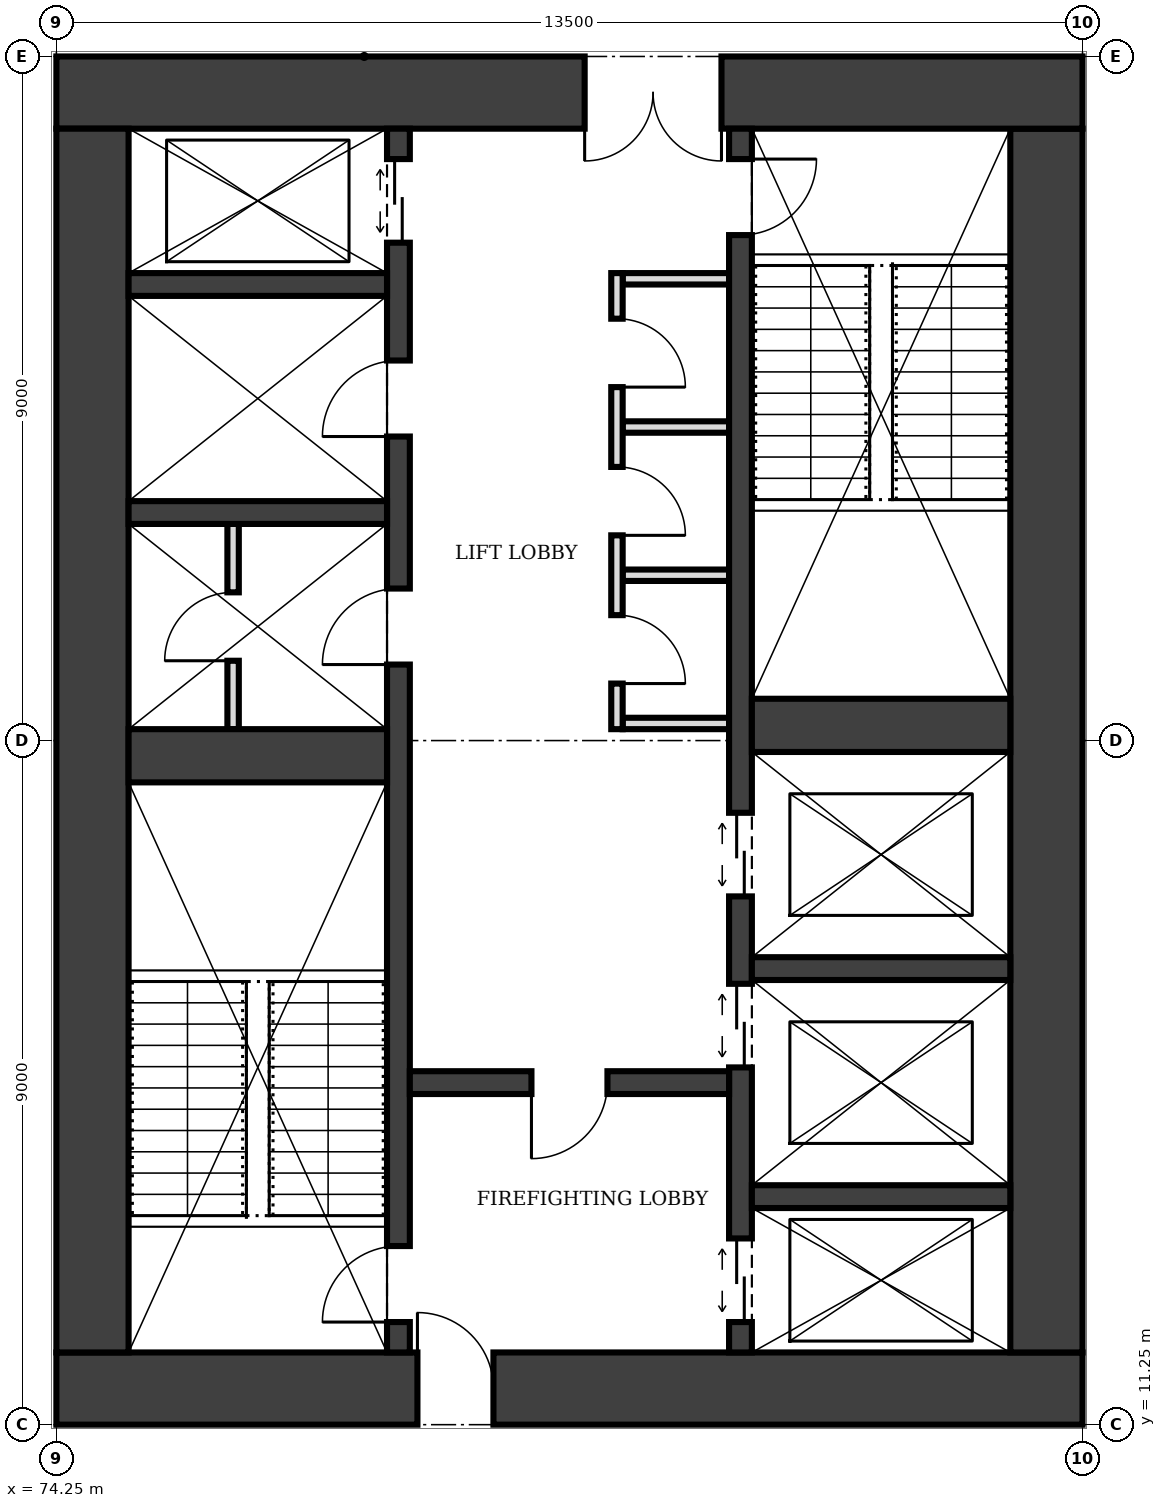
"""IFC4 building model, lengths in metres.
Left out: names, types, materials, properties, quantities, classifications, styles, units other than length and angle.
Written with IfcOpenShell. Run it as: python <this file> out.ifc"""

import sys

from ifc_helpers import new_model, si_unit, direction, frame, frame_2d, origin, place, context, subcontext, project, spatial, rectangle, extrude, element, fill, save


model = new_model("IFC4")
c1 = context("Model", 3, precision=1e-05, world=origin(), true_north=direction((0.0, 1.0)))
c2 = subcontext(c1, "Body", "Model", "MODEL_VIEW")
j1 = project(units=[si_unit("LENGTHUNIT", "METRE"), si_unit("PLANEANGLEUNIT", "RADIAN")], contexts=[c1])
p1 = place(None, origin())
s1 = spatial("IfcSite", under=j1, at=p1, CompositionType="ELEMENT")
p2 = place(p1, origin())
s2 = spatial("IfcBuilding", under=s1, at=p2, CompositionType="ELEMENT")
p3 = place(p2, frame((0.0, 0.0, 197.0)))
s3 = spatial("IfcBuildingStorey", under=s2, at=p3, CompositionType="ELEMENT", Elevation=197.0)
p4 = place(p3, frame((74.25, 11.725, 0.0), z_axis=(0.0, 0.0, 1.0), x_axis=(1.0, 0.0, 0.0)))
e1 = element("IfcWall", 1, at=p4, inside=s3, PredefinedType="SHEAR", context=c2, shape_type="SweptSolid", body=[
    extrude(rectangle(XDim=13.5, YDim=0.95, at=frame_2d((6.75, 0.0))), origin(), (0.0, 0.0, 1.0), 4.0),
])
p5 = place(p4, frame((4.75, 0.0, 0.0)))
e2 = element("IfcOpeningElement", 2, at=p5, cuts=e1, PredefinedType="OPENING", context=c2, shape_type="SweptSolid", body=[
    extrude(rectangle(XDim=1.0, YDim=2.1, at=frame_2d((0.5, 1.05))), frame((0.0, 0.485, 0.0), z_axis=(0.0, -1.0, 0.0), x_axis=(1.0, 0.0, 0.0)), (0.0, 0.0, 1.0), 0.97),
])
p6 = place(p3, frame((87.275, 12.2, 0.0), z_axis=(0.0, 0.0, 1.0), x_axis=(0.0, 1.0, 0.0)))
e3 = element("IfcWall", 3, at=p6, inside=s3, PredefinedType="SHEAR", context=c2, shape_type="SweptSolid", body=[
    extrude(rectangle(XDim=16.1, YDim=0.95, at=frame_2d((8.05, 0.0))), origin(), (0.0, 0.0, 1.0), 4.0),
])
p7 = place(p3, frame((87.75, 28.775, 0.0), z_axis=(0.0, 0.0, 1.0), x_axis=(-1.0, 0.0, 0.0)))
e4 = element("IfcWall", 4, at=p7, inside=s3, PredefinedType="SHEAR", context=c2, shape_type="SweptSolid", body=[
    extrude(rectangle(XDim=13.5, YDim=0.95, at=frame_2d((6.75, 0.0))), origin(), (0.0, 0.0, 1.0), 4.0),
])
p8 = place(p7, frame((4.75, 0.0, 0.0)))
e5 = element("IfcOpeningElement", 5, at=p8, cuts=e4, PredefinedType="OPENING", context=c2, shape_type="SweptSolid", body=[
    extrude(rectangle(XDim=1.8, YDim=2.1, at=frame_2d((0.9, 1.05))), frame((0.0, 0.485, 0.0), z_axis=(0.0, -1.0, 0.0), x_axis=(1.0, 0.0, 0.0)), (0.0, 0.0, 1.0), 0.97),
])
p9 = place(p3, frame((74.725, 28.3, 0.0), z_axis=(0.0, 0.0, 1.0), x_axis=(0.0, -1.0, 0.0)))
e6 = element("IfcWall", 6, at=p9, inside=s3, PredefinedType="SHEAR", context=c2, shape_type="SweptSolid", body=[
    extrude(rectangle(XDim=16.1, YDim=0.95, at=frame_2d((8.05, 0.0))), origin(), (0.0, 0.0, 1.0), 4.0),
])
p10 = place(p3, frame((78.75, 12.2, 0.0), z_axis=(0.0, 0.0, 1.0), x_axis=(0.0, 1.0, 0.0)))
e7 = element("IfcWall", 7, at=p10, inside=s3, PredefinedType="SHEAR", context=c2, shape_type="SweptSolid", body=[
    extrude(rectangle(XDim=16.1, YDim=0.3, at=frame_2d((8.05, 0.0))), origin(), (0.0, 0.0, 1.0), 4.0),
])
p11 = place(p10, frame((0.4, 0.0, 0.0)))
e8 = element("IfcOpeningElement", 8, at=p11, cuts=e7, PredefinedType="OPENING", context=c2, shape_type="SweptSolid", body=[
    extrude(rectangle(XDim=1.0, YDim=2.1, at=frame_2d((0.5, 1.05))), frame((0.0, 0.16, 0.0), z_axis=(0.0, -1.0, 0.0), x_axis=(1.0, 0.0, 0.0)), (0.0, 0.0, 1.0), 0.32),
])
p12 = place(p10, frame((14.6, 0.0, 0.0)))
e9 = element("IfcOpeningElement", 9, at=p12, cuts=e7, PredefinedType="OPENING", context=c2, shape_type="SweptSolid", body=[
    extrude(rectangle(XDim=1.1, YDim=2.1, at=frame_2d((0.55, 1.05))), frame((0.0, 0.16, 0.0), z_axis=(0.0, -1.0, 0.0), x_axis=(1.0, 0.0, 0.0)), (0.0, 0.0, 1.0), 0.32),
])
p13 = place(p10, frame((9.05, 0.0, 0.0)))
e10 = element("IfcOpeningElement", 10, at=p13, cuts=e7, PredefinedType="OPENING", context=c2, shape_type="SweptSolid", body=[
    extrude(rectangle(XDim=1.0, YDim=2.1, at=frame_2d((0.5, 1.05))), frame((0.0, 0.16, 0.0), z_axis=(0.0, -1.0, 0.0), x_axis=(1.0, 0.0, 0.0)), (0.0, 0.0, 1.0), 0.32),
])
p14 = place(p10, frame((12.05, 0.0, 0.0)))
e11 = element("IfcOpeningElement", 11, at=p14, cuts=e7, PredefinedType="OPENING", context=c2, shape_type="SweptSolid", body=[
    extrude(rectangle(XDim=1.0, YDim=2.1, at=frame_2d((0.5, 1.05))), frame((0.0, 0.16, 0.0), z_axis=(0.0, -1.0, 0.0), x_axis=(1.0, 0.0, 0.0)), (0.0, 0.0, 1.0), 0.32),
])
p15 = place(p3, frame((83.25, 12.2, 0.0), z_axis=(0.0, 0.0, 1.0), x_axis=(0.0, 1.0, 0.0)))
e12 = element("IfcWall", 12, at=p15, inside=s3, PredefinedType="SHEAR", context=c2, shape_type="SweptSolid", body=[
    extrude(rectangle(XDim=16.1, YDim=0.3, at=frame_2d((8.05, 0.0))), origin(), (0.0, 0.0, 1.0), 4.0),
])
p16 = place(p15, frame((14.7, 0.0, 0.0)))
e13 = element("IfcOpeningElement", 13, at=p16, cuts=e12, PredefinedType="OPENING", context=c2, shape_type="SweptSolid", body=[
    extrude(rectangle(XDim=1.0, YDim=2.1, at=frame_2d((0.5, 1.05))), frame((0.0, 0.16, 0.0), z_axis=(0.0, -1.0, 0.0), x_axis=(1.0, 0.0, 0.0)), (0.0, 0.0, 1.0), 0.32),
])
p17 = place(p15, frame((0.4, 0.0, 0.0)))
e14 = element("IfcOpeningElement", 14, at=p17, cuts=e12, PredefinedType="OPENING", context=c2, shape_type="SweptSolid", body=[
    extrude(rectangle(XDim=1.1, YDim=2.1, at=frame_2d((0.55, 1.05))), frame((0.0, 0.16, 0.0), z_axis=(0.0, -1.0, 0.0), x_axis=(1.0, 0.0, 0.0)), (0.0, 0.0, 1.0), 0.32),
])
p18 = place(p15, frame((3.75, 0.0, 0.0)))
e15 = element("IfcOpeningElement", 15, at=p18, cuts=e12, PredefinedType="OPENING", context=c2, shape_type="SweptSolid", body=[
    extrude(rectangle(XDim=1.1, YDim=2.1, at=frame_2d((0.55, 1.05))), frame((0.0, 0.16, 0.0), z_axis=(0.0, -1.0, 0.0), x_axis=(1.0, 0.0, 0.0)), (0.0, 0.0, 1.0), 0.32),
])
p19 = place(p15, frame((6.0, 0.0, 0.0)))
e16 = element("IfcOpeningElement", 16, at=p19, cuts=e12, PredefinedType="OPENING", context=c2, shape_type="SweptSolid", body=[
    extrude(rectangle(XDim=1.1, YDim=2.1, at=frame_2d((0.55, 1.05))), frame((0.0, 0.16, 0.0), z_axis=(0.0, -1.0, 0.0), x_axis=(1.0, 0.0, 0.0)), (0.0, 0.0, 1.0), 0.32),
])
p20 = place(p3, frame((75.2, 20.05, 0.0), z_axis=(0.0, 0.0, 1.0), x_axis=(1.0, 0.0, 0.0)))
e17 = element("IfcWall", 17, at=p20, inside=s3, PredefinedType="SHEAR", context=c2, shape_type="SweptSolid", body=[
    extrude(rectangle(XDim=3.4, YDim=0.7, at=frame_2d((1.7, 0.0))), origin(), (0.0, 0.0, 1.0), 4.0),
])
p21 = place(p3, frame((78.9, 15.75, 0.0), z_axis=(0.0, 0.0, 1.0), x_axis=(1.0, 0.0, 0.0)))
e18 = element("IfcWall", 18, at=p21, inside=s3, PredefinedType="SHEAR", context=c2, shape_type="SweptSolid", body=[
    extrude(rectangle(XDim=4.2, YDim=0.3, at=frame_2d((2.1, 0.0))), origin(), (0.0, 0.0, 1.0), 4.0),
])
p22 = place(p21, frame((1.6, 0.0, 0.0)))
e19 = element("IfcOpeningElement", 19, at=p22, cuts=e18, PredefinedType="OPENING", context=c2, shape_type="SweptSolid", body=[
    extrude(rectangle(XDim=1.0, YDim=2.1, at=frame_2d((0.5, 1.05))), frame((0.0, 0.16, 0.0), z_axis=(0.0, -1.0, 0.0), x_axis=(1.0, 0.0, 0.0)), (0.0, 0.0, 1.0), 0.32),
])
for number, where, z_axis, x_axis in (
    (20, (83.4, 14.25, 0.0), (0.0, 0.0, 1.0), (1.0, 0.0, 0.0)),
    (21, (83.4, 17.25, 0.0), (0.0, 0.0, 1.0), (1.0, 0.0, 0.0)),
):
    element("IfcWall", number, at=place(p3, frame(where, z_axis=z_axis, x_axis=x_axis)), inside=s3, PredefinedType="SHEAR", context=c2, shape_type="SweptSolid", body=[
        extrude(rectangle(XDim=3.4, YDim=0.3, at=frame_2d((1.7, 0.0))), origin(), (0.0, 0.0, 1.0), 4.0),
    ])
p23 = place(p3, frame((83.4, 20.45, 0.0), z_axis=(0.0, 0.0, 1.0), x_axis=(1.0, 0.0, 0.0)))
e22 = element("IfcWall", 22, at=p23, inside=s3, PredefinedType="SHEAR", context=c2, shape_type="SweptSolid", body=[
    extrude(rectangle(XDim=3.4, YDim=0.7, at=frame_2d((1.7, 0.0))), origin(), (0.0, 0.0, 1.0), 4.0),
])
for number, where, z_axis, x_axis in (
    (23, (75.2, 23.25, 0.0), (0.0, 0.0, 1.0), (1.0, 0.0, 0.0)),
    (24, (75.2, 26.25, 0.0), (0.0, 0.0, 1.0), (1.0, 0.0, 0.0)),
):
    element("IfcWall", number, at=place(p3, frame(where, z_axis=z_axis, x_axis=x_axis)), inside=s3, PredefinedType="SHEAR", context=c2, shape_type="SweptSolid", body=[
        extrude(rectangle(XDim=3.4, YDim=0.3, at=frame_2d((1.7, 0.0))), origin(), (0.0, 0.0, 1.0), 4.0),
    ])
p24 = place(p3, frame((81.625, 20.4, 0.0), z_axis=(0.0, 0.0, 1.0), x_axis=(0.0, 1.0, 0.0)))
e25 = element("IfcWall", 25, at=p24, inside=s3, PredefinedType="PARTITIONING", context=c2, shape_type="SweptSolid", body=[
    extrude(rectangle(XDim=6.0, YDim=0.15, at=frame_2d((3.0, 0.0))), origin(), (0.0, 0.0, 1.0), 3.75),
])
p25 = place(p24, frame((0.6, 0.0, 0.0)))
e26 = element("IfcOpeningElement", 26, at=p25, cuts=e25, PredefinedType="OPENING", context=c2, shape_type="SweptSolid", body=[
    extrude(rectangle(XDim=0.9, YDim=2.1, at=frame_2d((0.45, 1.05))), frame((0.0, 0.085, 0.0), z_axis=(0.0, -1.0, 0.0), x_axis=(1.0, 0.0, 0.0)), (0.0, 0.0, 1.0), 0.17),
])
p26 = place(p24, frame((2.55, 0.0, 0.0)))
e27 = element("IfcOpeningElement", 27, at=p26, cuts=e25, PredefinedType="OPENING", context=c2, shape_type="SweptSolid", body=[
    extrude(rectangle(XDim=0.9, YDim=2.1, at=frame_2d((0.45, 1.05))), frame((0.0, 0.085, 0.0), z_axis=(0.0, -1.0, 0.0), x_axis=(1.0, 0.0, 0.0)), (0.0, 0.0, 1.0), 0.17),
])
p27 = place(p24, frame((4.5, 0.0, 0.0)))
e28 = element("IfcOpeningElement", 28, at=p27, cuts=e25, PredefinedType="OPENING", context=c2, shape_type="SweptSolid", body=[
    extrude(rectangle(XDim=0.9, YDim=2.1, at=frame_2d((0.45, 1.05))), frame((0.0, 0.085, 0.0), z_axis=(0.0, -1.0, 0.0), x_axis=(1.0, 0.0, 0.0)), (0.0, 0.0, 1.0), 0.17),
])
for number, where, z_axis, x_axis in (
    (29, (81.7, 20.475, 0.0), (0.0, 0.0, 1.0), (1.0, 0.0, 0.0)),
    (30, (81.7, 22.425, 0.0), (0.0, 0.0, 1.0), (1.0, 0.0, 0.0)),
    (31, (81.7, 24.375, 0.0), (0.0, 0.0, 1.0), (1.0, 0.0, 0.0)),
    (32, (81.7, 26.325, 0.0), (0.0, 0.0, 1.0), (1.0, 0.0, 0.0)),
):
    element("IfcWall", number, at=place(p3, frame(where, z_axis=z_axis, x_axis=x_axis)), inside=s3, PredefinedType="PARTITIONING", context=c2, shape_type="SweptSolid", body=[
        extrude(rectangle(XDim=1.4, YDim=0.15, at=frame_2d((0.7, 0.0))), origin(), (0.0, 0.0, 1.0), 3.75),
    ])
p28 = place(p3, frame((76.575, 20.4, 0.0), z_axis=(0.0, 0.0, 1.0), x_axis=(0.0, 1.0, 0.0)))
e33 = element("IfcWall", 33, at=p28, inside=s3, PredefinedType="PARTITIONING", context=c2, shape_type="SweptSolid", body=[
    extrude(rectangle(XDim=2.7, YDim=0.15, at=frame_2d((1.35, 0.0))), origin(), (0.0, 0.0, 1.0), 3.75),
])
p29 = place(p28, frame((0.9, 0.0, 0.0)))
e34 = element("IfcOpeningElement", 34, at=p29, cuts=e33, PredefinedType="OPENING", context=c2, shape_type="SweptSolid", body=[
    extrude(rectangle(XDim=0.9, YDim=2.1, at=frame_2d((0.45, 1.05))), frame((0.0, 0.085, 0.0), z_axis=(0.0, -1.0, 0.0), x_axis=(1.0, 0.0, 0.0)), (0.0, 0.0, 1.0), 0.17),
])
p30 = place(p5, origin())
e35 = element("IfcDoor", 35, at=p30, inside=s3, OperationType="SINGLE_SWING_LEFT", PredefinedType="DOOR", context=c2, shape_type="SweptSolid", body=[
    extrude(rectangle(XDim=1.0, YDim=2.1, at=frame_2d((0.5, 1.05))), frame((0.0, 0.025, 0.0), z_axis=(0.0, -1.0, 0.0), x_axis=(1.0, 0.0, 0.0)), (0.0, 0.0, 1.0), 0.05),
])
fill(e2, e35)
p31 = place(p8, origin())
e36 = element("IfcDoor", 36, at=p31, inside=s3, OperationType="DOUBLE_DOOR_SINGLE_SWING", PredefinedType="DOOR", context=c2, shape_type="SweptSolid", body=[
    extrude(rectangle(XDim=1.8, YDim=2.1, at=frame_2d((0.9, 1.05))), frame((0.0, 0.025, 0.0), z_axis=(0.0, -1.0, 0.0), x_axis=(1.0, 0.0, 0.0)), (0.0, 0.0, 1.0), 0.05),
])
fill(e5, e36)
p32 = place(p22, frame((1.0, 0.0, 0.0), z_axis=(0.0, 0.0, 1.0), x_axis=(-1.0, 0.0, 0.0)))
e37 = element("IfcDoor", 37, at=p32, inside=s3, OperationType="SINGLE_SWING_RIGHT", PredefinedType="DOOR", context=c2, shape_type="SweptSolid", body=[
    extrude(rectangle(XDim=1.0, YDim=2.1, at=frame_2d((0.5, 1.05))), frame((0.0, 0.025, 0.0), z_axis=(0.0, -1.0, 0.0), x_axis=(1.0, 0.0, 0.0)), (0.0, 0.0, 1.0), 0.05),
])
fill(e19, e37)
p33 = place(p11, origin())
e38 = element("IfcDoor", 38, at=p33, inside=s3, OperationType="SINGLE_SWING_LEFT", PredefinedType="DOOR", context=c2, shape_type="SweptSolid", body=[
    extrude(rectangle(XDim=1.0, YDim=2.1, at=frame_2d((0.5, 1.05))), frame((0.0, 0.025, 0.0), z_axis=(0.0, -1.0, 0.0), x_axis=(1.0, 0.0, 0.0)), (0.0, 0.0, 1.0), 0.05),
])
fill(e8, e38)
p34 = place(p16, frame((1.0, 0.0, 0.0), z_axis=(0.0, 0.0, 1.0), x_axis=(-1.0, 0.0, 0.0)))
e39 = element("IfcDoor", 39, at=p34, inside=s3, OperationType="SINGLE_SWING_LEFT", PredefinedType="DOOR", context=c2, shape_type="SweptSolid", body=[
    extrude(rectangle(XDim=1.0, YDim=2.1, at=frame_2d((0.5, 1.05))), frame((0.0, 0.025, 0.0), z_axis=(0.0, -1.0, 0.0), x_axis=(1.0, 0.0, 0.0)), (0.0, 0.0, 1.0), 0.05),
])
fill(e13, e39)
p35 = place(p17, origin())
e40 = element("IfcDoor", 40, at=p35, inside=s3, OperationType="DOUBLE_DOOR_SLIDING", PredefinedType="DOOR", context=c2, shape_type="SweptSolid", body=[
    extrude(rectangle(XDim=1.1, YDim=2.1, at=frame_2d((0.55, 1.05))), frame((0.0, 0.025, 0.0), z_axis=(0.0, -1.0, 0.0), x_axis=(1.0, 0.0, 0.0)), (0.0, 0.0, 1.0), 0.05),
])
fill(e14, e40)
p36 = place(p12, origin())
e41 = element("IfcDoor", 41, at=p36, inside=s3, OperationType="DOUBLE_DOOR_SLIDING", PredefinedType="DOOR", context=c2, shape_type="SweptSolid", body=[
    extrude(rectangle(XDim=1.1, YDim=2.1, at=frame_2d((0.55, 1.05))), frame((0.0, 0.025, 0.0), z_axis=(0.0, -1.0, 0.0), x_axis=(1.0, 0.0, 0.0)), (0.0, 0.0, 1.0), 0.05),
])
fill(e9, e41)
p37 = place(p18, origin())
e42 = element("IfcDoor", 42, at=p37, inside=s3, OperationType="DOUBLE_DOOR_SLIDING", PredefinedType="DOOR", context=c2, shape_type="SweptSolid", body=[
    extrude(rectangle(XDim=1.1, YDim=2.1, at=frame_2d((0.55, 1.05))), frame((0.0, 0.025, 0.0), z_axis=(0.0, -1.0, 0.0), x_axis=(1.0, 0.0, 0.0)), (0.0, 0.0, 1.0), 0.05),
])
fill(e15, e42)
p38 = place(p19, origin())
e43 = element("IfcDoor", 43, at=p38, inside=s3, OperationType="DOUBLE_DOOR_SLIDING", PredefinedType="DOOR", context=c2, shape_type="SweptSolid", body=[
    extrude(rectangle(XDim=1.1, YDim=2.1, at=frame_2d((0.55, 1.05))), frame((0.0, 0.025, 0.0), z_axis=(0.0, -1.0, 0.0), x_axis=(1.0, 0.0, 0.0)), (0.0, 0.0, 1.0), 0.05),
])
fill(e16, e43)
p39 = place(p25, frame((0.9, 0.0, 0.0), z_axis=(0.0, 0.0, 1.0), x_axis=(-1.0, 0.0, 0.0)))
e44 = element("IfcDoor", 44, at=p39, inside=s3, OperationType="SINGLE_SWING_RIGHT", PredefinedType="DOOR", context=c2, shape_type="SweptSolid", body=[
    extrude(rectangle(XDim=0.9, YDim=2.1, at=frame_2d((0.45, 1.05))), frame((0.0, 0.025, 0.0), z_axis=(0.0, -1.0, 0.0), x_axis=(1.0, 0.0, 0.0)), (0.0, 0.0, 1.0), 0.05),
])
fill(e26, e44)
p40 = place(p26, frame((0.9, 0.0, 0.0), z_axis=(0.0, 0.0, 1.0), x_axis=(-1.0, 0.0, 0.0)))
e45 = element("IfcDoor", 45, at=p40, inside=s3, OperationType="SINGLE_SWING_RIGHT", PredefinedType="DOOR", context=c2, shape_type="SweptSolid", body=[
    extrude(rectangle(XDim=0.9, YDim=2.1, at=frame_2d((0.45, 1.05))), frame((0.0, 0.025, 0.0), z_axis=(0.0, -1.0, 0.0), x_axis=(1.0, 0.0, 0.0)), (0.0, 0.0, 1.0), 0.05),
])
fill(e27, e45)
p41 = place(p27, frame((0.9, 0.0, 0.0), z_axis=(0.0, 0.0, 1.0), x_axis=(-1.0, 0.0, 0.0)))
e46 = element("IfcDoor", 46, at=p41, inside=s3, OperationType="SINGLE_SWING_RIGHT", PredefinedType="DOOR", context=c2, shape_type="SweptSolid", body=[
    extrude(rectangle(XDim=0.9, YDim=2.1, at=frame_2d((0.45, 1.05))), frame((0.0, 0.025, 0.0), z_axis=(0.0, -1.0, 0.0), x_axis=(1.0, 0.0, 0.0)), (0.0, 0.0, 1.0), 0.05),
])
fill(e28, e46)
p42 = place(p13, origin())
e47 = element("IfcDoor", 47, at=p42, inside=s3, OperationType="SINGLE_SWING_LEFT", PredefinedType="DOOR", context=c2, shape_type="SweptSolid", body=[
    extrude(rectangle(XDim=1.0, YDim=2.1, at=frame_2d((0.5, 1.05))), frame((0.0, 0.025, 0.0), z_axis=(0.0, -1.0, 0.0), x_axis=(1.0, 0.0, 0.0)), (0.0, 0.0, 1.0), 0.05),
])
fill(e10, e47)
p43 = place(p29, origin())
e48 = element("IfcDoor", 48, at=p43, inside=s3, OperationType="SINGLE_SWING_LEFT", PredefinedType="DOOR", context=c2, shape_type="SweptSolid", body=[
    extrude(rectangle(XDim=0.9, YDim=2.1, at=frame_2d((0.45, 1.05))), frame((0.0, 0.025, 0.0), z_axis=(0.0, -1.0, 0.0), x_axis=(1.0, 0.0, 0.0)), (0.0, 0.0, 1.0), 0.05),
])
fill(e34, e48)
p44 = place(p14, origin())
e49 = element("IfcDoor", 49, at=p44, inside=s3, OperationType="SINGLE_SWING_LEFT", PredefinedType="DOOR", context=c2, shape_type="SweptSolid", body=[
    extrude(rectangle(XDim=1.0, YDim=2.1, at=frame_2d((0.5, 1.05))), frame((0.0, 0.025, 0.0), z_axis=(0.0, -1.0, 0.0), x_axis=(1.0, 0.0, 0.0)), (0.0, 0.0, 1.0), 0.05),
])
fill(e11, e49)
save(model, sys.argv[1])
